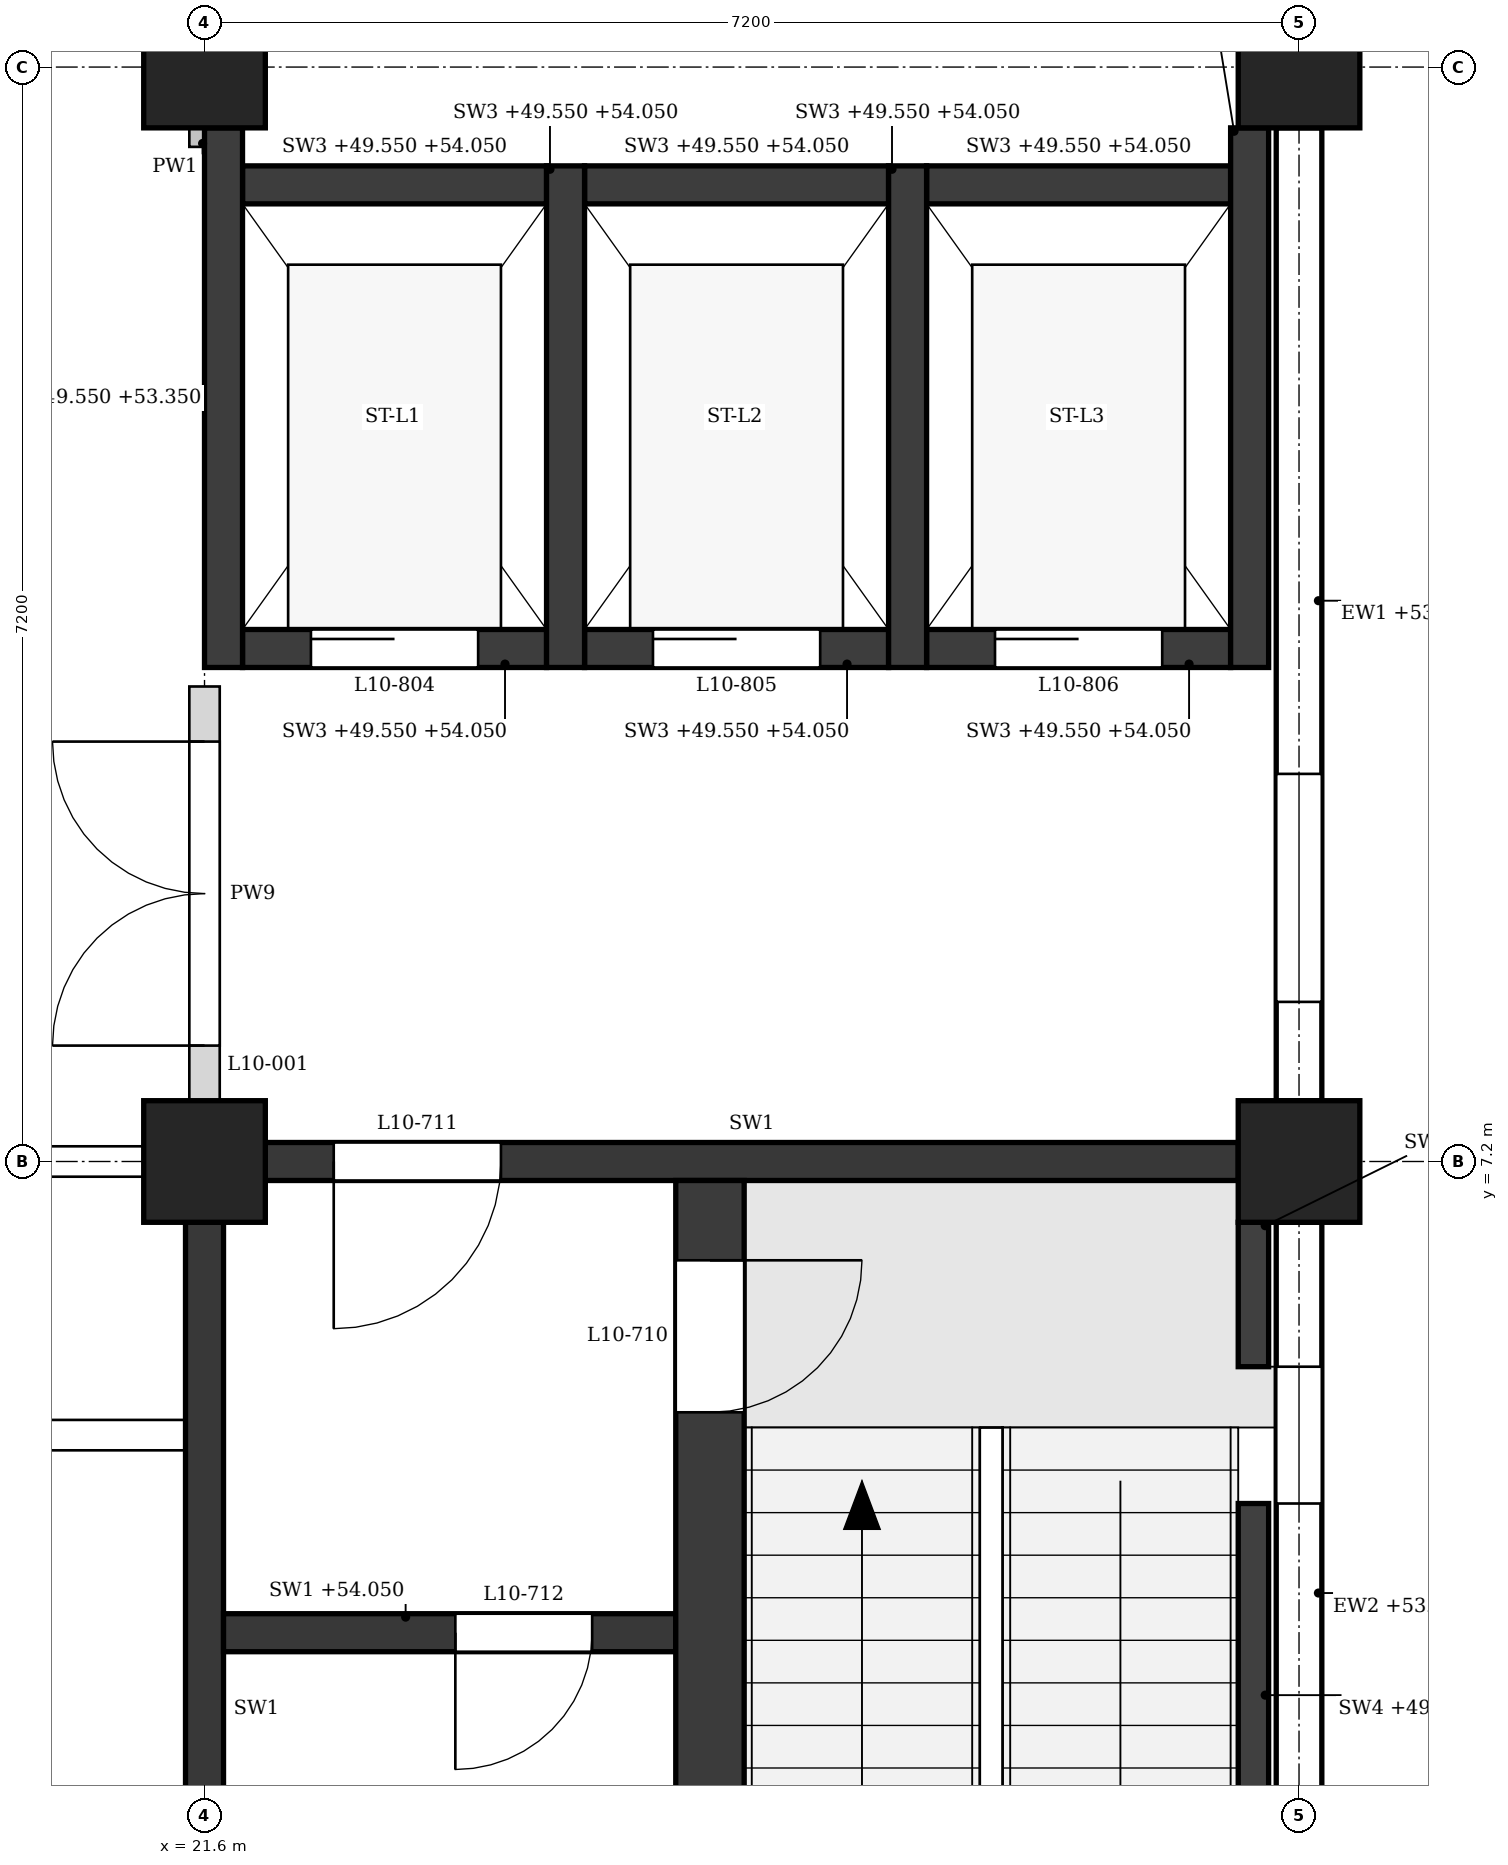
"""IFC4 building model, lengths in metres.
Left out: names, types, materials, properties, quantities, classifications, styles, units other than length and angle.
Written with IfcOpenShell. Run it as: python <this file> out.ifc"""

import sys

from ifc_helpers import new_model, si_unit, direction, frame, frame_2d, origin, origin_2d, place, context, subcontext, project, spatial, polyline, rectangle, outline, extrude, element, fill, save


model = new_model("IFC4")
c1 = context("Model", 3, precision=1e-05, world=origin(), true_north=direction((0.0, 1.0)))
c2 = subcontext(c1, "Body", "Model", "MODEL_VIEW")
j1 = project(units=[si_unit("LENGTHUNIT", "METRE"), si_unit("PLANEANGLEUNIT", "RADIAN")], contexts=[c1])
p1 = place(None, origin())
s1 = spatial("IfcSite", under=j1, at=p1, CompositionType="ELEMENT")
p2 = place(p1, origin())
s2 = spatial("IfcBuilding", under=s1, at=p2, CompositionType="ELEMENT")
p3 = place(p2, frame((0.0, 0.0, 49.8)))
s3 = spatial("IfcBuildingStorey", under=s2, at=p3, CompositionType="ELEMENT", Elevation=49.8)
for number, where, z_axis, x_axis in (
    (1, (21.6, 7.2, 0.0), (0.0, 0.0, 1.0), (1.0, 0.0, 0.0)),
    (2, (21.6, 14.4, 0.0), (0.0, 0.0, 1.0), (1.0, 0.0, 0.0)),
    (3, (28.8, 7.2, 0.0), (0.0, 0.0, 1.0), (1.0, 0.0, 0.0)),
    (4, (28.8, 14.4, 0.0), (0.0, 0.0, 1.0), (1.0, 0.0, 0.0)),
):
    element("IfcColumn", number, at=place(p3, frame(where, z_axis=z_axis, x_axis=x_axis)), inside=s3, PredefinedType="COLUMN", context=c2, shape_type="SweptSolid", body=[
        extrude(rectangle(XDim=0.8, YDim=0.8, at=origin_2d()), origin(), (0.0, 0.0, 1.0), 4.5),
    ])
p4 = place(p3, frame((28.8, 0.4, 0.0), z_axis=(0.0, 0.0, 1.0), x_axis=(0.0, 1.0, 0.0)))
e5 = element("IfcWall", 5, at=p4, inside=s3, PredefinedType="STANDARD", context=c2, shape_type="SweptSolid", body=[
    extrude(rectangle(XDim=6.4, YDim=0.3, at=frame_2d((3.2, 0.0))), origin(), (0.0, 0.0, 1.0), 3.65),
])
p5 = place(p4, frame((0.95, 0.0, 0.9)))
e6 = element("IfcOpeningElement", 6, at=p5, cuts=e5, PredefinedType="OPENING", context=c2, shape_type="SweptSolid", body=[
    extrude(outline(polyline([(0.0, 0.0), (0.9, 0.0), (0.9, 2.15), (0.45, 2.6), (0.0, 2.15), (0.0, 0.0)])), frame((0.0, 0.16, 0.0), z_axis=(0.0, -1.0, 0.0), x_axis=(1.0, 0.0, 0.0)), (0.0, 0.0, 1.0), 0.32),
])
p6 = place(p4, frame((4.55, 0.0, 0.9)))
e7 = element("IfcOpeningElement", 7, at=p6, cuts=e5, PredefinedType="OPENING", context=c2, shape_type="SweptSolid", body=[
    extrude(outline(polyline([(0.0, 0.0), (0.9, 0.0), (0.9, 2.15), (0.45, 2.6), (0.0, 2.15), (0.0, 0.0)])), frame((0.0, 0.16, 0.0), z_axis=(0.0, -1.0, 0.0), x_axis=(1.0, 0.0, 0.0)), (0.0, 0.0, 1.0), 0.32),
])
p7 = place(p3, frame((28.8, 7.6, 0.0), z_axis=(0.0, 0.0, 1.0), x_axis=(0.0, 1.0, 0.0)))
e8 = element("IfcWall", 8, at=p7, inside=s3, PredefinedType="STANDARD", context=c2, shape_type="SweptSolid", body=[
    extrude(rectangle(XDim=6.4, YDim=0.3, at=frame_2d((3.2, 0.0))), origin(), (0.0, 0.0, 1.0), 3.65),
])
p8 = place(p7, frame((0.65, 0.0, 0.9)))
e9 = element("IfcOpeningElement", 9, at=p8, cuts=e8, PredefinedType="OPENING", context=c2, shape_type="SweptSolid", body=[
    extrude(outline(polyline([(0.0, 0.0), (1.5, 0.0), (1.5, 1.85), (0.75, 2.6), (0.0, 1.85), (0.0, 0.0)])), frame((0.0, 0.16, 0.0), z_axis=(0.0, -1.0, 0.0), x_axis=(1.0, 0.0, 0.0)), (0.0, 0.0, 1.0), 0.32),
])
p9 = place(p3, frame((22.0, 7.2, 0.0), z_axis=(0.0, 0.0, 1.0), x_axis=(1.0, 0.0, 0.0)))
e10 = element("IfcWall", 10, at=p9, inside=s3, PredefinedType="SHEAR", context=c2, shape_type="SweptSolid", body=[
    extrude(rectangle(XDim=6.4, YDim=0.25, at=frame_2d((3.2, 0.0))), origin(), (0.0, 0.0, 1.0), 3.55),
])
p10 = place(p9, frame((0.45, 0.0, 0.0)))
e11 = element("IfcOpeningElement", 11, at=p10, cuts=e10, PredefinedType="OPENING", context=c2, shape_type="SweptSolid", body=[
    extrude(rectangle(XDim=1.1, YDim=2.1, at=frame_2d((0.55, 1.05))), frame((0.0, 0.135, 0.0), z_axis=(0.0, -1.0, 0.0), x_axis=(1.0, 0.0, 0.0)), (0.0, 0.0, 1.0), 0.27),
])
p11 = place(p3, frame((21.6, 0.4, 0.0), z_axis=(0.0, 0.0, 1.0), x_axis=(0.0, 1.0, 0.0)))
e12 = element("IfcWall", 12, at=p11, inside=s3, PredefinedType="SHEAR", context=c2, shape_type="SweptSolid", body=[
    extrude(rectangle(XDim=6.4, YDim=0.25, at=frame_2d((3.2, 0.0))), origin(), (0.0, 0.0, 1.0), 3.55),
])
p12 = place(p3, frame((28.5, 2.25, -0.25), z_axis=(0.0, 0.0, 1.0), x_axis=(0.0, 1.0, 0.0)))
e13 = element("IfcWall", 13, at=p12, inside=s3, PredefinedType="SHEAR", context=c2, shape_type="SweptSolid", body=[
    extrude(rectangle(XDim=2.7, YDim=0.2, at=frame_2d((1.35, 0.0))), origin(), (0.0, 0.0, 1.0), 4.5),
])
p13 = place(p3, frame((28.5, 5.85, -0.25), z_axis=(0.0, 0.0, 1.0), x_axis=(0.0, 1.0, 0.0)))
e14 = element("IfcWall", 14, at=p13, inside=s3, PredefinedType="SHEAR", context=c2, shape_type="SweptSolid", body=[
    extrude(rectangle(XDim=0.95, YDim=0.2, at=frame_2d((0.475, 0.0))), origin(), (0.0, 0.0, 1.0), 4.5),
])
p14 = place(p3, frame((24.925, 0.15, 0.0), z_axis=(0.0, 0.0, 1.0), x_axis=(0.0, 1.0, 0.0)))
e15 = element("IfcWall", 15, at=p14, inside=s3, PredefinedType="SHEAR", context=c2, shape_type="SweptSolid", body=[
    extrude(rectangle(XDim=6.925, YDim=0.45, at=frame_2d((3.462, 0.0))), origin(), (0.0, 0.0, 1.0), 4.25),
])
p15 = place(p14, frame((5.4, 0.0, 0.0)))
e16 = element("IfcOpeningElement", 16, at=p15, cuts=e15, PredefinedType="OPENING", context=c2, shape_type="SweptSolid", body=[
    extrude(rectangle(XDim=1.0, YDim=2.1, at=frame_2d((0.5, 1.05))), frame((0.0, 0.235, 0.0), z_axis=(0.0, -1.0, 0.0), x_axis=(1.0, 0.0, 0.0)), (0.0, 0.0, 1.0), 0.47),
])
p16 = place(p3, frame((21.725, 4.1, 0.0), z_axis=(0.0, 0.0, 1.0), x_axis=(1.0, 0.0, 0.0)))
e17 = element("IfcWall", 17, at=p16, inside=s3, PredefinedType="SHEAR", context=c2, shape_type="SweptSolid", body=[
    extrude(rectangle(XDim=2.975, YDim=0.25, at=frame_2d((1.487, 0.0))), origin(), (0.0, 0.0, 1.0), 4.25),
])
p17 = place(p16, frame((1.525, 0.0, 0.0)))
e18 = element("IfcOpeningElement", 18, at=p17, cuts=e17, PredefinedType="OPENING", context=c2, shape_type="SweptSolid", body=[
    extrude(rectangle(XDim=0.9, YDim=2.1, at=frame_2d((0.45, 1.05))), frame((0.0, 0.135, 0.0), z_axis=(0.0, -1.0, 0.0), x_axis=(1.0, 0.0, 0.0)), (0.0, 0.0, 1.0), 0.27),
])
p18 = place(p3, frame((21.725, 10.45, -0.25), z_axis=(0.0, 0.0, 1.0), x_axis=(0.0, 1.0, 0.0)))
e19 = element("IfcWall", 19, at=p18, inside=s3, PredefinedType="SHEAR", context=c2, shape_type="SweptSolid", body=[
    extrude(rectangle(XDim=3.55, YDim=0.25, at=frame_2d((1.775, 0.0))), origin(), (0.0, 0.0, 1.0), 3.8),
])
for number, where, z_axis, x_axis in (
    (20, (23.975, 10.45, -0.25), (0.0, 0.0, 1.0), (0.0, 1.0, 0.0)),
    (21, (26.225, 10.45, -0.25), (0.0, 0.0, 1.0), (0.0, 1.0, 0.0)),
):
    element("IfcWall", number, at=place(p3, frame(where, z_axis=z_axis, x_axis=x_axis)), inside=s3, PredefinedType="SHEAR", context=c2, shape_type="SweptSolid", body=[
        extrude(rectangle(XDim=3.3, YDim=0.25, at=frame_2d((1.65, 0.0))), origin(), (0.0, 0.0, 1.0), 4.5),
    ])
p19 = place(p3, frame((28.475, 10.45, -0.25), z_axis=(0.0, 0.0, 1.0), x_axis=(0.0, 1.0, 0.0)))
e22 = element("IfcWall", 22, at=p19, inside=s3, PredefinedType="SHEAR", context=c2, shape_type="SweptSolid", body=[
    extrude(rectangle(XDim=3.55, YDim=0.25, at=frame_2d((1.775, 0.0))), origin(), (0.0, 0.0, 1.0), 4.5),
])
p20 = place(p3, frame((21.85, 10.575, -0.25), z_axis=(0.0, 0.0, 1.0), x_axis=(1.0, 0.0, 0.0)))
e23 = element("IfcWall", 23, at=p20, inside=s3, PredefinedType="SHEAR", context=c2, shape_type="SweptSolid", body=[
    extrude(rectangle(XDim=2.0, YDim=0.25, at=frame_2d((1.0, 0.0))), origin(), (0.0, 0.0, 1.0), 4.5),
])
p21 = place(p20, frame((0.45, 0.0, 0.25)))
e24 = element("IfcOpeningElement", 24, at=p21, cuts=e23, PredefinedType="OPENING", context=c2, shape_type="SweptSolid", body=[
    extrude(rectangle(XDim=1.1, YDim=2.1, at=frame_2d((0.55, 1.05))), frame((0.0, 0.135, 0.0), z_axis=(0.0, -1.0, 0.0), x_axis=(1.0, 0.0, 0.0)), (0.0, 0.0, 1.0), 0.27),
])
p22 = place(p3, frame((21.85, 13.625, -0.25), z_axis=(0.0, 0.0, 1.0), x_axis=(1.0, 0.0, 0.0)))
e25 = element("IfcWall", 25, at=p22, inside=s3, PredefinedType="SHEAR", context=c2, shape_type="SweptSolid", body=[
    extrude(rectangle(XDim=2.0, YDim=0.25, at=frame_2d((1.0, 0.0))), origin(), (0.0, 0.0, 1.0), 4.5),
])
p23 = place(p3, frame((24.1, 10.575, -0.25), z_axis=(0.0, 0.0, 1.0), x_axis=(1.0, 0.0, 0.0)))
e26 = element("IfcWall", 26, at=p23, inside=s3, PredefinedType="SHEAR", context=c2, shape_type="SweptSolid", body=[
    extrude(rectangle(XDim=2.0, YDim=0.25, at=frame_2d((1.0, 0.0))), origin(), (0.0, 0.0, 1.0), 4.5),
])
p24 = place(p23, frame((0.45, 0.0, 0.25)))
e27 = element("IfcOpeningElement", 27, at=p24, cuts=e26, PredefinedType="OPENING", context=c2, shape_type="SweptSolid", body=[
    extrude(rectangle(XDim=1.1, YDim=2.1, at=frame_2d((0.55, 1.05))), frame((0.0, 0.135, 0.0), z_axis=(0.0, -1.0, 0.0), x_axis=(1.0, 0.0, 0.0)), (0.0, 0.0, 1.0), 0.27),
])
p25 = place(p3, frame((24.1, 13.625, -0.25), z_axis=(0.0, 0.0, 1.0), x_axis=(1.0, 0.0, 0.0)))
e28 = element("IfcWall", 28, at=p25, inside=s3, PredefinedType="SHEAR", context=c2, shape_type="SweptSolid", body=[
    extrude(rectangle(XDim=2.0, YDim=0.25, at=frame_2d((1.0, 0.0))), origin(), (0.0, 0.0, 1.0), 4.5),
])
p26 = place(p3, frame((26.35, 10.575, -0.25), z_axis=(0.0, 0.0, 1.0), x_axis=(1.0, 0.0, 0.0)))
e29 = element("IfcWall", 29, at=p26, inside=s3, PredefinedType="SHEAR", context=c2, shape_type="SweptSolid", body=[
    extrude(rectangle(XDim=2.0, YDim=0.25, at=frame_2d((1.0, 0.0))), origin(), (0.0, 0.0, 1.0), 4.5),
])
p27 = place(p26, frame((0.45, 0.0, 0.25)))
e30 = element("IfcOpeningElement", 30, at=p27, cuts=e29, PredefinedType="OPENING", context=c2, shape_type="SweptSolid", body=[
    extrude(rectangle(XDim=1.1, YDim=2.1, at=frame_2d((0.55, 1.05))), frame((0.0, 0.135, 0.0), z_axis=(0.0, -1.0, 0.0), x_axis=(1.0, 0.0, 0.0)), (0.0, 0.0, 1.0), 0.27),
])
p28 = place(p3, frame((26.35, 13.625, -0.25), z_axis=(0.0, 0.0, 1.0), x_axis=(1.0, 0.0, 0.0)))
e31 = element("IfcWall", 31, at=p28, inside=s3, PredefinedType="SHEAR", context=c2, shape_type="SweptSolid", body=[
    extrude(rectangle(XDim=2.0, YDim=0.25, at=frame_2d((1.0, 0.0))), origin(), (0.0, 0.0, 1.0), 4.5),
])
p29 = place(p3, frame((7.325, 5.4, 0.0), z_axis=(0.0, 0.0, 1.0), x_axis=(1.0, 0.0, 0.0)))
e32 = element("IfcWall", 32, at=p29, inside=s3, PredefinedType="PARTITIONING", context=c2, shape_type="SweptSolid", body=[
    extrude(outline(polyline([(0.0, 0.0), (14.15, 0.0), (14.15, 3.55), (14.05, 3.55), (14.05, 4.25), (7.3, 4.25), (7.3, 3.55), (6.85, 3.55), (6.85, 4.25), (0.1, 4.25), (0.1, 3.55), (0.0, 3.55), (0.0, 0.0)])), frame((0.0, 0.1, 0.0), z_axis=(0.0, -1.0, 0.0), x_axis=(1.0, 0.0, 0.0)), (0.0, 0.0, 1.0), 0.2),
])
p30 = place(p29, frame((1.238, 0.0, 0.0)))
e33 = element("IfcOpeningElement", 33, at=p30, cuts=e32, PredefinedType="OPENING", context=c2, shape_type="SweptSolid", body=[
    extrude(rectangle(XDim=1.0, YDim=2.1, at=frame_2d((0.5, 1.05))), frame((0.0, 0.11, 0.0), z_axis=(0.0, -1.0, 0.0), x_axis=(1.0, 0.0, 0.0)), (0.0, 0.0, 1.0), 0.22),
])
p31 = place(p29, frame((4.775, 0.0, 0.0)))
e34 = element("IfcOpeningElement", 34, at=p31, cuts=e32, PredefinedType="OPENING", context=c2, shape_type="SweptSolid", body=[
    extrude(rectangle(XDim=1.0, YDim=2.1, at=frame_2d((0.5, 1.05))), frame((0.0, 0.11, 0.0), z_axis=(0.0, -1.0, 0.0), x_axis=(1.0, 0.0, 0.0)), (0.0, 0.0, 1.0), 0.22),
])
p32 = place(p29, frame((8.375, 0.0, 0.0)))
e35 = element("IfcOpeningElement", 35, at=p32, cuts=e32, PredefinedType="OPENING", context=c2, shape_type="SweptSolid", body=[
    extrude(rectangle(XDim=1.0, YDim=2.1, at=frame_2d((0.5, 1.05))), frame((0.0, 0.11, 0.0), z_axis=(0.0, -1.0, 0.0), x_axis=(1.0, 0.0, 0.0)), (0.0, 0.0, 1.0), 0.22),
])
p33 = place(p29, frame((11.913, 0.0, 0.0)))
e36 = element("IfcOpeningElement", 36, at=p33, cuts=e32, PredefinedType="OPENING", context=c2, shape_type="SweptSolid", body=[
    extrude(rectangle(XDim=1.0, YDim=2.1, at=frame_2d((0.5, 1.05))), frame((0.0, 0.11, 0.0), z_axis=(0.0, -1.0, 0.0), x_axis=(1.0, 0.0, 0.0)), (0.0, 0.0, 1.0), 0.22),
])
p34 = place(p3, frame((14.8, 7.2, 0.0), z_axis=(0.0, 0.0, 1.0), x_axis=(1.0, 0.0, 0.0)))
e37 = element("IfcWall", 37, at=p34, inside=s3, PredefinedType="PARTITIONING", context=c2, shape_type="SweptSolid", body=[
    extrude(rectangle(XDim=6.4, YDim=0.2, at=frame_2d((3.2, 0.0))), origin(), (0.0, 0.0, 1.0), 3.55),
])
p35 = place(p34, frame((4.3, 0.0, 0.0)))
e38 = element("IfcOpeningElement", 38, at=p35, cuts=e37, PredefinedType="OPENING", context=c2, shape_type="SweptSolid", body=[
    extrude(rectangle(XDim=1.0, YDim=2.1, at=frame_2d((0.5, 1.05))), frame((0.0, 0.11, 0.0), z_axis=(0.0, -1.0, 0.0), x_axis=(1.0, 0.0, 0.0)), (0.0, 0.0, 1.0), 0.22),
])
p36 = place(p3, frame((21.6, 7.6, 0.0), z_axis=(0.0, 0.0, 1.0), x_axis=(0.0, 1.0, 0.0)))
e39 = element("IfcWall", 39, at=p36, inside=s3, PredefinedType="PARTITIONING", context=c2, shape_type="SweptSolid", body=[
    extrude(rectangle(XDim=2.725, YDim=0.2, at=frame_2d((1.362, 0.0))), origin(), (0.0, 0.0, 1.0), 3.55),
])
p37 = place(p36, frame((0.362, 0.0, 0.0)))
e40 = element("IfcOpeningElement", 40, at=p37, cuts=e39, PredefinedType="OPENING", context=c2, shape_type="SweptSolid", body=[
    extrude(rectangle(XDim=2.0, YDim=2.4, at=frame_2d((1.0, 1.2))), frame((0.0, 0.11, 0.0), z_axis=(0.0, -1.0, 0.0), x_axis=(1.0, 0.0, 0.0)), (0.0, 0.0, 1.0), 0.22),
])
p38 = place(p3, frame((21.6, 13.875, 0.0), z_axis=(0.0, 0.0, 1.0), x_axis=(0.0, 1.0, 0.0)))
e41 = element("IfcWall", 41, at=p38, inside=s3, PredefinedType="PARTITIONING", context=c2, shape_type="SweptSolid", body=[
    extrude(rectangle(XDim=0.125, YDim=0.2, at=frame_2d((0.062, 0.0))), origin(), (0.0, 0.0, 1.0), 3.55),
])
p39 = place(p6, origin())
e42 = element("IfcWindow", 42, at=p39, inside=s3, PartitioningType="SINGLE_PANEL", PredefinedType="WINDOW", context=c2, shape_type="SweptSolid", body=[
    extrude(outline(polyline([(0.0, 0.0), (0.9, 0.0), (0.9, 2.15), (0.45, 2.6), (0.0, 2.15), (0.0, 0.0)])), frame((0.0, 0.03, 0.0), z_axis=(0.0, -1.0, 0.0), x_axis=(1.0, 0.0, 0.0)), (0.0, 0.0, 1.0), 0.06),
])
fill(e7, e42)
p40 = place(p8, origin())
e43 = element("IfcWindow", 43, at=p40, inside=s3, PartitioningType="SINGLE_PANEL", PredefinedType="WINDOW", context=c2, shape_type="SweptSolid", body=[
    extrude(outline(polyline([(0.0, 0.0), (1.5, 0.0), (1.5, 1.85), (0.75, 2.6), (0.0, 1.85), (0.0, 0.0)])), frame((0.0, 0.03, 0.0), z_axis=(0.0, -1.0, 0.0), x_axis=(1.0, 0.0, 0.0)), (0.0, 0.0, 1.0), 0.06),
])
fill(e9, e43)
p41 = place(p15, frame((1.0, 0.0, 0.0), z_axis=(0.0, 0.0, 1.0), x_axis=(-1.0, 0.0, 0.0)))
e44 = element("IfcDoor", 44, at=p41, inside=s3, OperationType="SINGLE_SWING_LEFT", PredefinedType="DOOR", context=c2, shape_type="SweptSolid", body=[
    extrude(rectangle(XDim=1.0, YDim=2.1, at=frame_2d((0.5, 1.05))), frame((0.0, 0.025, 0.0), z_axis=(0.0, -1.0, 0.0), x_axis=(1.0, 0.0, 0.0)), (0.0, 0.0, 1.0), 0.05),
])
fill(e16, e44)
p42 = place(p10, frame((1.1, 0.0, 0.0), z_axis=(0.0, 0.0, 1.0), x_axis=(-1.0, 0.0, 0.0)))
e45 = element("IfcDoor", 45, at=p42, inside=s3, OperationType="SINGLE_SWING_RIGHT", PredefinedType="DOOR", context=c2, shape_type="SweptSolid", body=[
    extrude(rectangle(XDim=1.1, YDim=2.1, at=frame_2d((0.55, 1.05))), frame((0.0, 0.025, 0.0), z_axis=(0.0, -1.0, 0.0), x_axis=(1.0, 0.0, 0.0)), (0.0, 0.0, 1.0), 0.05),
])
fill(e11, e45)
p43 = place(p17, frame((0.9, 0.0, 0.0), z_axis=(0.0, 0.0, 1.0), x_axis=(-1.0, 0.0, 0.0)))
e46 = element("IfcDoor", 46, at=p43, inside=s3, OperationType="SINGLE_SWING_RIGHT", PredefinedType="DOOR", context=c2, shape_type="SweptSolid", body=[
    extrude(rectangle(XDim=0.9, YDim=2.1, at=frame_2d((0.45, 1.05))), frame((0.0, 0.025, 0.0), z_axis=(0.0, -1.0, 0.0), x_axis=(1.0, 0.0, 0.0)), (0.0, 0.0, 1.0), 0.05),
])
fill(e18, e46)
p44 = place(p21, origin())
e47 = element("IfcDoor", 47, at=p44, inside=s3, OperationType="SLIDING_TO_LEFT", PredefinedType="DOOR", context=c2, shape_type="SweptSolid", body=[
    extrude(rectangle(XDim=1.1, YDim=2.1, at=frame_2d((0.55, 1.05))), frame((0.0, 0.025, 0.0), z_axis=(0.0, -1.0, 0.0), x_axis=(1.0, 0.0, 0.0)), (0.0, 0.0, 1.0), 0.05),
])
fill(e24, e47)
p45 = place(p24, origin())
e48 = element("IfcDoor", 48, at=p45, inside=s3, OperationType="SLIDING_TO_LEFT", PredefinedType="DOOR", context=c2, shape_type="SweptSolid", body=[
    extrude(rectangle(XDim=1.1, YDim=2.1, at=frame_2d((0.55, 1.05))), frame((0.0, 0.025, 0.0), z_axis=(0.0, -1.0, 0.0), x_axis=(1.0, 0.0, 0.0)), (0.0, 0.0, 1.0), 0.05),
])
fill(e27, e48)
p46 = place(p27, origin())
e49 = element("IfcDoor", 49, at=p46, inside=s3, OperationType="SLIDING_TO_LEFT", PredefinedType="DOOR", context=c2, shape_type="SweptSolid", body=[
    extrude(rectangle(XDim=1.1, YDim=2.1, at=frame_2d((0.55, 1.05))), frame((0.0, 0.025, 0.0), z_axis=(0.0, -1.0, 0.0), x_axis=(1.0, 0.0, 0.0)), (0.0, 0.0, 1.0), 0.05),
])
fill(e30, e49)
p47 = place(p37, origin())
e50 = element("IfcDoor", 50, at=p47, inside=s3, OperationType="DOUBLE_DOOR_SINGLE_SWING", PredefinedType="DOOR", context=c2, shape_type="SweptSolid", body=[
    extrude(rectangle(XDim=2.0, YDim=2.4, at=frame_2d((1.0, 1.2))), frame((0.0, 0.025, 0.0), z_axis=(0.0, -1.0, 0.0), x_axis=(1.0, 0.0, 0.0)), (0.0, 0.0, 1.0), 0.05),
])
fill(e40, e50)
save(model, sys.argv[1])
